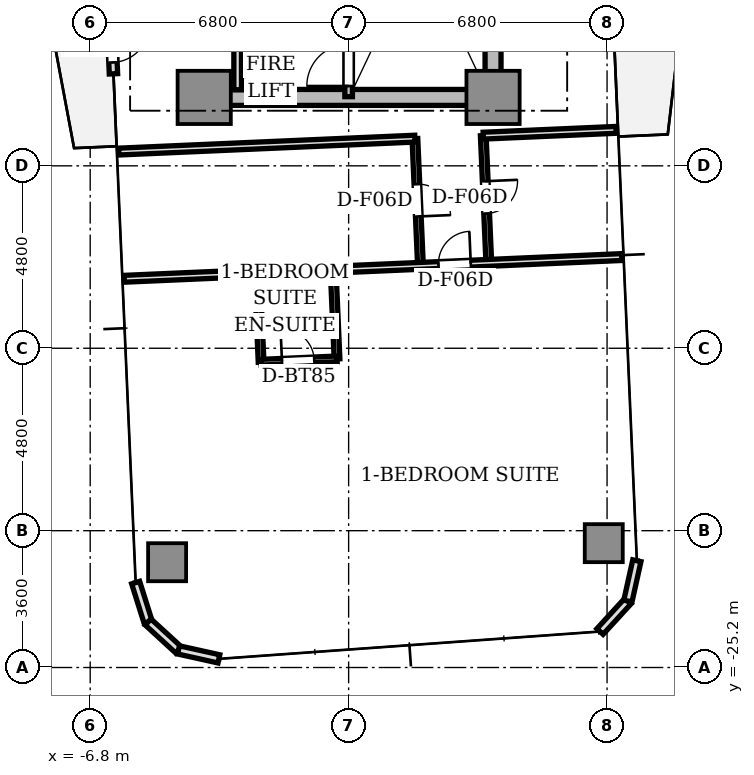
"""IFC4 building model, lengths in metres.
Left out: names, types, materials, properties, quantities, classifications, styles, units other than length and angle.
Written with IfcOpenShell. Run it as: python <this file> out.ifc"""

import sys

from ifc_helpers import new_model, si_unit, direction, frame, frame_2d, origin, origin_2d, place, context, subcontext, project, spatial, rectangle, extrude, source, transform, mapped, element, fill, save


model = new_model("IFC4")
c1 = context("Model", 3, precision=1e-05, world=origin(), true_north=direction((0.0, 1.0)))
c2 = subcontext(c1, "Body", "Model", "MODEL_VIEW")
j1 = project(units=[si_unit("LENGTHUNIT", "METRE"), si_unit("PLANEANGLEUNIT", "RADIAN")], contexts=[c1])
p1 = place(None, origin())
s1 = spatial("IfcSite", under=j1, at=p1, CompositionType="ELEMENT")
p2 = place(p1, origin())
s2 = spatial("IfcBuilding", under=s1, at=p2, CompositionType="ELEMENT")
p3 = place(p2, frame((0.0, 0.0, 124.85)))
s3 = spatial("IfcBuildingStorey", under=s2, at=p3, CompositionType="ELEMENT", Elevation=124.85)
p4 = place(p3, frame((-3.55, -10.2, 0.0), z_axis=(0.0, 0.0, 1.0), x_axis=(1.0, 0.0, 0.0)))
e1 = element("IfcWall", 1, at=p4, inside=s3, PredefinedType="SHEAR", context=c2, shape_type="SweptSolid", body=[
    extrude(rectangle(XDim=7.1, YDim=0.42, at=frame_2d((3.55, 0.0))), origin(), (0.0, 0.0, 1.0), 3.11),
])
p5 = place(p3, frame((3.8, -9.75, 0.0), z_axis=(0.0, 0.0, 1.0), x_axis=(0.0, 1.0, 0.0)))
e2 = element("IfcWall", 2, at=p5, inside=s3, PredefinedType="SHEAR", context=c2, shape_type="SweptSolid", body=[
    extrude(rectangle(XDim=6.9, YDim=0.42, at=frame_2d((3.45, 0.0))), origin(), (0.0, 0.0, 1.0), 3.11),
])
m1 = source(origin(), c2, "Body", "SweptSolid", [
    extrude(rectangle(XDim=1.4, YDim=1.4, at=origin_2d()), origin(), (0.0, 0.0, 1.0), 3.11),
])
for number, where, z_axis, x_axis in (
    (3, (-3.8, -10.2, 0.0), (0.0, 0.0, 1.0), (1.0, 0.0, 0.0)),
    (4, (3.8, -10.2, 0.0), (0.0, 0.0, 1.0), (1.0, 0.0, 0.0)),
):
    element("IfcColumn", number, at=place(p3, frame(where, z_axis=z_axis, x_axis=x_axis)), inside=s3, PredefinedType="COLUMN", context=c2, shape_type="MappedRepresentation", body=[
        mapped(m1, transform((0.0, 0.0, 0.0), scale=1.0)),
    ])
m2 = source(origin(), c2, "Body", "SweptSolid", [
    extrude(rectangle(XDim=1.0, YDim=1.0, at=origin_2d()), origin(), (0.0, 0.0, 1.0), 3.11),
])
for number, where, z_axis, x_axis in (
    (5, (-4.776, -22.43, 0.0), (0.0, 0.0, 1.0), (1.0, 0.0, 0.0)),
    (6, (6.713, -21.928, 0.0), (0.0, 0.0, 1.0), (1.0, 0.0, 0.0)),
):
    element("IfcColumn", number, at=place(p3, frame(where, z_axis=z_axis, x_axis=x_axis)), inside=s3, PredefinedType="COLUMN", context=c2, shape_type="MappedRepresentation", body=[
        mapped(m2, transform((0.0, 0.0, 0.0), scale=1.0)),
    ])
p6 = place(p3, frame((-6.306, -6.882, 0.0), z_axis=(0.0, 0.0, 1.0), x_axis=(0.043672655174, -0.999045894436, 0.0)))
e7 = element("IfcWall", 7, at=p6, inside=s3, PredefinedType="STANDARD", context=c2, shape_type="SweptSolid", body=[
    extrude(rectangle(XDim=2.7, YDim=0.22, at=frame_2d((1.35, 0.0))), origin(), (0.0, 0.0, 1.0), 3.11),
])
p7 = place(p6, frame((1.4, 0.0, 0.0)))
e8 = element("IfcOpeningElement", 8, at=p7, cuts=e7, PredefinedType="OPENING", context=c2, shape_type="SweptSolid", body=[
    extrude(rectangle(XDim=1.0, YDim=2.2, at=frame_2d((0.5, 1.1))), frame((0.0, 0.12, 0.0), z_axis=(0.0, -1.0, 0.0), x_axis=(1.0, 0.0, 0.0)), (0.0, 0.0, 1.0), 0.24),
])
p8 = place(p3, frame((-5.604, -22.966, 0.0), z_axis=(0.0, 0.0, 1.0), x_axis=(0.300755105707, -0.953701403161, 0.0)))
e9 = element("IfcWall", 9, at=p8, inside=s3, PredefinedType="STANDARD", context=c2, shape_type="SweptSolid", body=[
    extrude(rectangle(XDim=1.087, YDim=0.22, at=frame_2d((0.543, 0.0))), origin(), (0.0, 0.0, 1.0), 3.11),
])
p9 = place(p3, frame((-5.277, -24.003, 0.0), z_axis=(0.0, 0.0, 1.0), x_axis=(0.737312600672, -0.675551721847, 0.0)))
e10 = element("IfcWall", 10, at=p9, inside=s3, PredefinedType="STANDARD", context=c2, shape_type="SweptSolid", body=[
    extrude(rectangle(XDim=1.087, YDim=0.22, at=frame_2d((0.543, 0.0))), origin(), (0.0, 0.0, 1.0), 3.11),
])
for number, where, z_axis, x_axis in (
    (11, (-4.475, -24.737, 0.0), (0.0, 0.0, 1.0), (0.976, -0.217, 0.0)),
    (12, (6.614, -24.253, 0.0), (0.0, 0.0, 1.0), (0.676, 0.737, 0.0)),
):
    element("IfcWall", number, at=place(p3, frame(where, z_axis=z_axis, x_axis=x_axis)), inside=s3, PredefinedType="STANDARD", context=c2, shape_type="SweptSolid", body=[
        extrude(rectangle(XDim=1.087, YDim=0.22, at=frame_2d((0.543, 0.0))), origin(), (0.0, 0.0, 1.0), 3.11),
    ])
p10 = place(p3, frame((7.349, -23.452, 0.0), z_axis=(0.0, 0.0, 1.0), x_axis=(0.216454939174, 0.976292609471, 0.0)))
e13 = element("IfcWall", 13, at=p10, inside=s3, PredefinedType="STANDARD", context=c2, shape_type="SweptSolid", body=[
    extrude(rectangle(XDim=1.087, YDim=0.22, at=frame_2d((0.544, 0.0))), origin(), (0.0, 0.0, 1.0), 3.11),
])
p11 = place(p3, frame((0.0, -10.18, 0.0), z_axis=(0.0, 0.0, 1.0), x_axis=(0.0, 1.0, 0.0)))
e14 = element("IfcWall", 14, at=p11, inside=s3, PredefinedType="SOLIDWALL", context=c2, shape_type="SweptSolid", body=[
    extrude(rectangle(XDim=7.68, YDim=0.2, at=frame_2d((3.84, 0.0))), origin(), (0.0, 0.0, 1.0), 3.11),
])
p12 = place(p11, frame((0.28, 0.0, 0.0)))
e15 = element("IfcOpeningElement", 15, at=p12, cuts=e14, PredefinedType="OPENING", context=c2, shape_type="SweptSolid", body=[
    extrude(rectangle(XDim=1.1, YDim=2.15, at=frame_2d((0.55, 1.075))), frame((0.0, 0.11, 0.0), z_axis=(0.0, -1.0, 0.0), x_axis=(1.0, 0.0, 0.0)), (0.0, 0.0, 1.0), 0.22),
])
p13 = place(p3, frame((-2.92, -10.0, 0.0), z_axis=(0.0, 0.0, 1.0), x_axis=(0.0, 1.0, 0.0)))
e16 = element("IfcWall", 16, at=p13, inside=s3, PredefinedType="SOLIDWALL", context=c2, shape_type="SweptSolid", body=[
    extrude(rectangle(XDim=1.44, YDim=0.2, at=frame_2d((0.72, 0.0))), origin(), (0.0, 0.0, 1.0), 2.66),
])
p14 = place(p3, frame((3.542, -11.206, 0.0), z_axis=(0.0, 0.0, 1.0), x_axis=(0.043582710367, -0.99904982226, 0.0)))
e17 = element("IfcWall", 17, at=p14, inside=s3, PredefinedType="PARTITIONING", context=c2, shape_type="SweptSolid", body=[
    extrude(rectangle(XDim=3.35, YDim=0.15, at=frame_2d((1.675, 0.0))), origin(), (0.0, 0.0, 1.0), 2.66),
])
p15 = place(p14, frame((1.2, 0.0, 0.0)))
e18 = element("IfcOpeningElement", 18, at=p15, cuts=e17, PredefinedType="OPENING", context=c2, shape_type="SweptSolid", body=[
    extrude(rectangle(XDim=0.85, YDim=2.1, at=frame_2d((0.425, 1.05))), frame((0.0, 0.085, 0.0), z_axis=(0.0, -1.0, 0.0), x_axis=(1.0, 0.0, 0.0)), (0.0, 0.0, 1.0), 0.17),
])
p16 = place(p3, frame((1.744, -11.285, 0.0), z_axis=(0.0, 0.0, 1.0), x_axis=(0.043579537274, -0.999049960678, 0.0)))
e19 = element("IfcWall", 19, at=p16, inside=s3, PredefinedType="PARTITIONING", context=c2, shape_type="SweptSolid", body=[
    extrude(rectangle(XDim=3.35, YDim=0.15, at=frame_2d((1.675, 0.0))), origin(), (0.0, 0.0, 1.0), 2.66),
])
p17 = place(p16, frame((1.2, 0.0, 0.0)))
e20 = element("IfcOpeningElement", 20, at=p17, cuts=e19, PredefinedType="OPENING", context=c2, shape_type="SweptSolid", body=[
    extrude(rectangle(XDim=0.85, YDim=2.1, at=frame_2d((0.425, 1.05))), frame((0.0, 0.085, 0.0), z_axis=(0.0, -1.0, 0.0), x_axis=(1.0, 0.0, 0.0)), (0.0, 0.0, 1.0), 0.17),
])
p18 = place(p3, frame((3.542, -11.206, 0.0), z_axis=(0.0, 0.0, 1.0), x_axis=(0.999046129111, 0.04366728647, 0.0)))
e21 = element("IfcWall", 21, at=p18, inside=s3, PredefinedType="PARTITIONING", context=c2, shape_type="SweptSolid", body=[
    extrude(rectangle(XDim=3.5, YDim=0.18, at=frame_2d((1.75, 0.0))), origin(), (0.0, 0.0, 1.0), 2.66),
])
p19 = place(p3, frame((-6.049, -11.625, 0.0), z_axis=(0.0, 0.0, 1.0), x_axis=(0.999047634936, 0.043632821702, 0.0)))
e22 = element("IfcWall", 22, at=p19, inside=s3, PredefinedType="PARTITIONING", context=c2, shape_type="SweptSolid", body=[
    extrude(rectangle(XDim=7.8, YDim=0.18, at=frame_2d((3.9, 0.0))), origin(), (0.0, 0.0, 1.0), 2.66),
])
p20 = place(p3, frame((-5.903, -14.972, 0.0), z_axis=(0.0, 0.0, 1.0), x_axis=(0.999048653727, 0.043609488494, 0.0)))
e23 = element("IfcWall", 23, at=p20, inside=s3, PredefinedType="PARTITIONING", context=c2, shape_type="SweptSolid", body=[
    extrude(rectangle(XDim=13.1, YDim=0.18, at=frame_2d((6.55, 0.0))), origin(), (0.0, 0.0, 1.0), 2.66),
])
p21 = place(p20, frame((8.275, 0.0, 0.0)))
e24 = element("IfcOpeningElement", 24, at=p21, cuts=e23, PredefinedType="OPENING", context=c2, shape_type="SweptSolid", body=[
    extrude(rectangle(XDim=0.85, YDim=2.1, at=frame_2d((0.425, 1.05))), frame((0.0, 0.1, 0.0), z_axis=(0.0, -1.0, 0.0), x_axis=(1.0, 0.0, 0.0)), (0.0, 0.0, 1.0), 0.2),
])
p22 = place(p3, frame((-0.408, -14.732, 0.0), z_axis=(0.0, 0.0, 1.0), x_axis=(0.043527387554, -0.999052234136, 0.0)))
e25 = element("IfcWall", 25, at=p22, inside=s3, PredefinedType="PARTITIONING", context=c2, shape_type="SweptSolid", body=[
    extrude(rectangle(XDim=2.35, YDim=0.15, at=frame_2d((1.175, 0.0))), origin(), (0.0, 0.0, 1.0), 2.66),
])
p23 = place(p3, frame((-2.406, -14.819, 0.0), z_axis=(0.0, 0.0, 1.0), x_axis=(0.04363560271, -0.999047513473, 0.0)))
e26 = element("IfcWall", 26, at=p23, inside=s3, PredefinedType="PARTITIONING", context=c2, shape_type="SweptSolid", body=[
    extrude(rectangle(XDim=2.35, YDim=0.15, at=frame_2d((1.175, 0.0))), origin(), (0.0, 0.0, 1.0), 2.66),
])
p24 = place(p3, frame((-2.303, -17.167, 0.0), z_axis=(0.0, 0.0, 1.0), x_axis=(0.999049929275, 0.043580257179, 0.0)))
e27 = element("IfcWall", 27, at=p24, inside=s3, PredefinedType="PARTITIONING", context=c2, shape_type="SweptSolid", body=[
    extrude(rectangle(XDim=2.0, YDim=0.15, at=frame_2d((1.0, 0.0))), origin(), (0.0, 0.0, 1.0), 2.66),
])
p25 = place(p24, frame((0.55, 0.0, 0.0)))
e28 = element("IfcOpeningElement", 28, at=p25, cuts=e27, PredefinedType="OPENING", context=c2, shape_type="SweptSolid", body=[
    extrude(rectangle(XDim=0.85, YDim=2.1, at=frame_2d((0.425, 1.05))), frame((0.0, 0.085, 0.0), z_axis=(0.0, -1.0, 0.0), x_axis=(1.0, 0.0, 0.0)), (0.0, 0.0, 1.0), 0.17),
])
m3 = source(origin(), c2, "Body", "SweptSolid", [
    extrude(rectangle(XDim=1.0, YDim=0.05, at=origin_2d()), origin(), (0.0, 0.0, 1.0), 2.2),
])
p26 = place(p7, frame((0.5, 0.0, 0.0)))
e29 = element("IfcDoor", 29, at=p26, inside=s3, OperationType="SINGLE_SWING_LEFT", PredefinedType="DOOR", context=c2, shape_type="MappedRepresentation", body=[
    mapped(m3, transform((0.0, 0.0, 0.0), scale=1.0)),
])
fill(e8, e29)
m4 = source(origin(), c2, "Body", "SweptSolid", [
    extrude(rectangle(XDim=1.1, YDim=0.05, at=origin_2d()), origin(), (0.0, 0.0, 1.0), 2.15),
])
p27 = place(p12, frame((0.55, 0.0, 0.0)))
e30 = element("IfcDoor", 30, at=p27, inside=s3, OperationType="SINGLE_SWING_LEFT", PredefinedType="DOOR", context=c2, shape_type="MappedRepresentation", body=[
    mapped(m4, transform((0.0, 0.0, 0.0), scale=1.0)),
])
fill(e15, e30)
m5 = source(origin(), c2, "Body", "SweptSolid", [
    extrude(rectangle(XDim=0.85, YDim=0.05, at=origin_2d()), origin(), (0.0, 0.0, 1.0), 2.1),
])
p28 = place(p15, frame((0.425, 0.0, 0.0)))
e31 = element("IfcDoor", 31, at=p28, inside=s3, OperationType="SINGLE_SWING_LEFT", PredefinedType="DOOR", context=c2, shape_type="MappedRepresentation", body=[
    mapped(m5, transform((0.0, 0.0, 0.0), scale=1.0)),
])
fill(e18, e31)
p29 = place(p17, frame((0.425, 0.0, 0.0)))
e32 = element("IfcDoor", 32, at=p29, inside=s3, OperationType="SINGLE_SWING_RIGHT", PredefinedType="DOOR", context=c2, shape_type="MappedRepresentation", body=[
    mapped(m5, transform((0.0, 0.0, 0.0), scale=1.0)),
])
fill(e20, e32)
p30 = place(p25, frame((0.425, 0.0, 0.0)))
e33 = element("IfcDoor", 33, at=p30, inside=s3, OperationType="SINGLE_SWING_LEFT", PredefinedType="DOOR", context=c2, shape_type="MappedRepresentation", body=[
    mapped(m5, transform((0.0, 0.0, 0.0), scale=1.0)),
])
fill(e28, e33)
p31 = place(p21, frame((0.425, 0.0, 0.0)))
e34 = element("IfcDoor", 34, at=p31, inside=s3, OperationType="SINGLE_SWING_RIGHT", PredefinedType="DOOR", context=c2, shape_type="MappedRepresentation", body=[
    mapped(m5, transform((0.0, 0.0, 0.0), scale=1.0)),
])
fill(e24, e34)
save(model, sys.argv[1])
